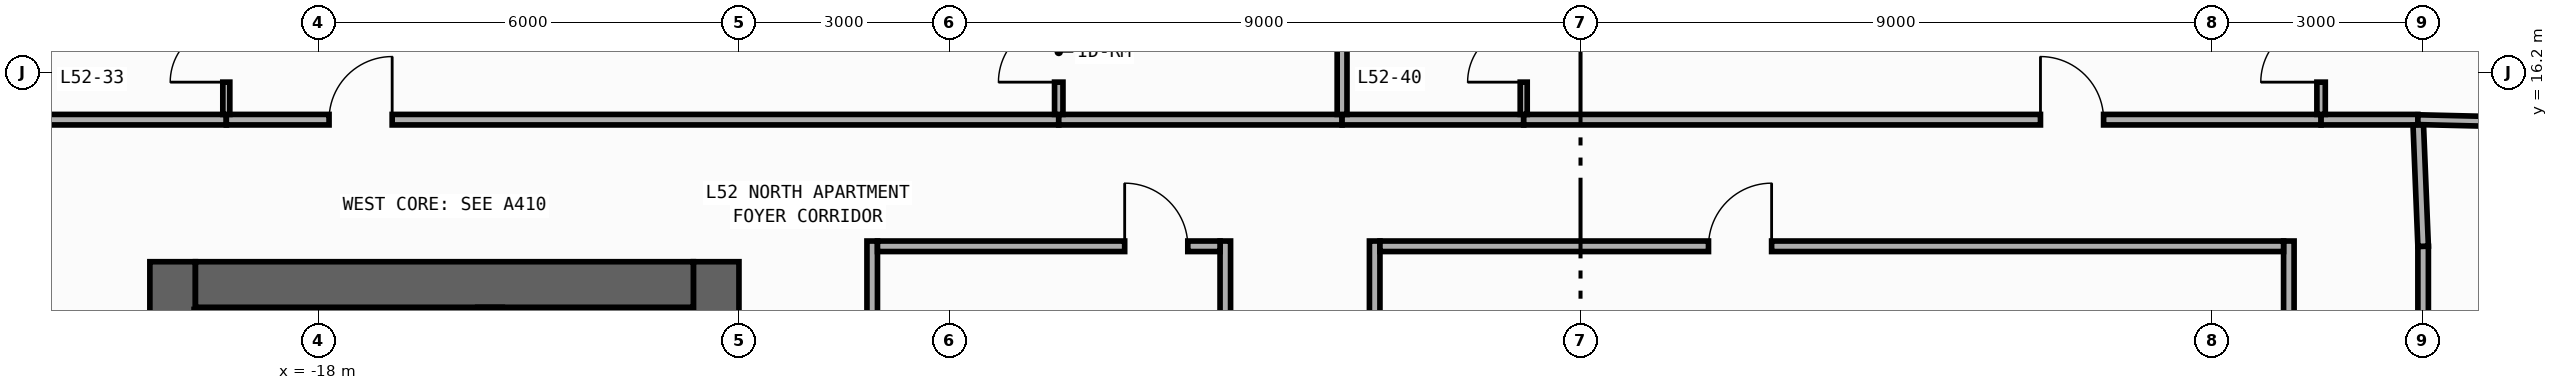
"""IFC4 building model, lengths in metres.
Left out: names, types, materials, properties, quantities, classifications, styles, units other than length and angle.
Written with IfcOpenShell. Run it as: python <this file> out.ifc"""

import sys

from ifc_helpers import new_model, si_unit, direction, frame, frame_2d, origin, place, context, subcontext, project, spatial, rectangle, extrude, element, fill, save


model = new_model("IFC4")
c1 = context("Model", 3, precision=1e-05, world=origin(), true_north=direction((0.0, 1.0)))
c2 = subcontext(c1, "Body", "Model", "MODEL_VIEW")
j1 = project(units=[si_unit("LENGTHUNIT", "METRE"), si_unit("PLANEANGLEUNIT", "RADIAN")], contexts=[c1])
p1 = place(None, origin())
s1 = spatial("IfcSite", under=j1, at=p1, CompositionType="ELEMENT")
p2 = place(p1, origin())
s2 = spatial("IfcBuilding", under=s1, at=p2, CompositionType="ELEMENT")
p3 = place(p2, frame((0.0, 0.0, 226.0)))
s3 = spatial("IfcBuildingStorey", under=s2, at=p3, CompositionType="ELEMENT", Elevation=226.0)
p4 = place(p3, frame((-20.075, -13.5, 0.0), z_axis=(0.0, 0.0, 1.0), x_axis=(0.0, 1.0, 0.0)))
e1 = element("IfcWall", 1, at=p4, inside=s3, PredefinedType="SHEAR", context=c2, shape_type="SweptSolid", body=[
    extrude(rectangle(XDim=27.0, YDim=0.65, at=frame_2d((13.5, 0.0))), origin(), (0.0, 0.0, 1.0), 3.34),
])
p5 = place(p3, frame((-12.325, -13.5, 0.0), z_axis=(0.0, 0.0, 1.0), x_axis=(0.0, 1.0, 0.0)))
e2 = element("IfcWall", 2, at=p5, inside=s3, PredefinedType="SHEAR", context=c2, shape_type="SweptSolid", body=[
    extrude(rectangle(XDim=27.0, YDim=0.65, at=frame_2d((13.5, 0.0))), origin(), (0.0, 0.0, 1.0), 3.34),
])
p6 = place(p5, frame((15.175, 0.0, 0.0)))
e3 = element("IfcOpeningElement", 3, at=p6, cuts=e2, PredefinedType="OPENING", context=c2, shape_type="SweptSolid", body=[
    extrude(rectangle(XDim=0.85, YDim=2.1, at=frame_2d((0.425, 1.05))), frame((0.0, 0.335, 0.0), z_axis=(0.0, -1.0, 0.0), x_axis=(1.0, 0.0, 0.0)), (0.0, 0.0, 1.0), 0.67),
])
p7 = place(p5, frame((21.275, 0.0, 0.0)))
e4 = element("IfcOpeningElement", 4, at=p7, cuts=e2, PredefinedType="OPENING", context=c2, shape_type="SweptSolid", body=[
    extrude(rectangle(XDim=0.85, YDim=2.1, at=frame_2d((0.425, 1.05))), frame((0.0, 0.335, 0.0), z_axis=(0.0, -1.0, 0.0), x_axis=(1.0, 0.0, 0.0)), (0.0, 0.0, 1.0), 0.67),
])
p8 = place(p5, frame((4.275, 0.0, 0.0)))
e5 = element("IfcOpeningElement", 5, at=p8, cuts=e2, PredefinedType="OPENING", context=c2, shape_type="SweptSolid", body=[
    extrude(rectangle(XDim=0.85, YDim=2.1, at=frame_2d((0.425, 1.05))), frame((0.0, 0.335, 0.0), z_axis=(0.0, -1.0, 0.0), x_axis=(1.0, 0.0, 0.0)), (0.0, 0.0, 1.0), 0.67),
])
p9 = place(p5, frame((10.275, 0.0, 0.0)))
e6 = element("IfcOpeningElement", 6, at=p9, cuts=e2, PredefinedType="OPENING", context=c2, shape_type="SweptSolid", body=[
    extrude(rectangle(XDim=0.85, YDim=2.1, at=frame_2d((0.425, 1.05))), frame((0.0, 0.335, 0.0), z_axis=(0.0, -1.0, 0.0), x_axis=(1.0, 0.0, 0.0)), (0.0, 0.0, 1.0), 0.67),
])
p10 = place(p5, frame((12.725, 0.0, 0.0)))
e7 = element("IfcOpeningElement", 7, at=p10, cuts=e2, PredefinedType="OPENING", context=c2, shape_type="SweptSolid", body=[
    extrude(rectangle(XDim=1.15, YDim=2.2, at=frame_2d((0.575, 1.1))), frame((0.0, 0.335, 0.0), z_axis=(0.0, -1.0, 0.0), x_axis=(1.0, 0.0, 0.0)), (0.0, 0.0, 1.0), 0.67),
])
p11 = place(p5, frame((1.625, 0.0, 0.0)))
e8 = element("IfcOpeningElement", 8, at=p11, cuts=e2, PredefinedType="OPENING", context=c2, shape_type="SweptSolid", body=[
    extrude(rectangle(XDim=0.85, YDim=2.1, at=frame_2d((0.425, 1.05))), frame((0.0, 0.335, 0.0), z_axis=(0.0, -1.0, 0.0), x_axis=(1.0, 0.0, 0.0)), (0.0, 0.0, 1.0), 0.67),
])
p12 = place(p3, frame((-19.75, 13.175, 0.0), z_axis=(0.0, 0.0, 1.0), x_axis=(1.0, 0.0, 0.0)))
e9 = element("IfcWall", 9, at=p12, inside=s3, PredefinedType="SHEAR", context=c2, shape_type="SweptSolid", body=[
    extrude(rectangle(XDim=7.1, YDim=0.65, at=frame_2d((3.55, 0.0))), origin(), (0.0, 0.0, 1.0), 3.34),
])
p13 = place(p3, frame((-15.55, -12.85, 0.0), z_axis=(0.0, 0.0, 1.0), x_axis=(0.0, 1.0, 0.0)))
e10 = element("IfcWall", 10, at=p13, inside=s3, PredefinedType="SHEAR", context=c2, shape_type="SweptSolid", body=[
    extrude(rectangle(XDim=25.7, YDim=0.35, at=frame_2d((12.85, 0.0))), origin(), (0.0, 0.0, 1.0), 3.34),
])
p14 = place(p13, frame((12.075, 0.0, 0.0)))
e11 = element("IfcOpeningElement", 11, at=p14, cuts=e10, PredefinedType="OPENING", context=c2, shape_type="SweptSolid", body=[
    extrude(rectangle(XDim=1.15, YDim=2.2, at=frame_2d((0.575, 1.1))), frame((0.0, 0.185, 0.0), z_axis=(0.0, -1.0, 0.0), x_axis=(1.0, 0.0, 0.0)), (0.0, 0.0, 1.0), 0.37),
])
p15 = place(p13, frame((0.975, 0.0, 0.0)))
e12 = element("IfcOpeningElement", 12, at=p15, cuts=e10, PredefinedType="OPENING", context=c2, shape_type="SweptSolid", body=[
    extrude(rectangle(XDim=0.85, YDim=2.1, at=frame_2d((0.425, 1.05))), frame((0.0, 0.185, 0.0), z_axis=(0.0, -1.0, 0.0), x_axis=(1.0, 0.0, 0.0)), (0.0, 0.0, 1.0), 0.37),
])
p16 = place(p3, frame((-19.77, 12.71, 0.0), z_axis=(0.0, 0.0, 1.0), x_axis=(1.0, 0.0, 0.0)))
e13 = element("IfcWall", 13, at=p16, inside=s3, PredefinedType="SHEAR", context=c2, shape_type="SweptSolid", body=[
    extrude(rectangle(XDim=4.065, YDim=0.22, at=frame_2d((2.032, 0.0))), origin(), (0.0, 0.0, 1.0), 3.34),
])
p17 = place(p3, frame((-10.1, -2.81, 0.0), z_axis=(0.0, 0.0, 1.0), x_axis=(0.0, 1.0, 0.0)))
e14 = element("IfcWall", 14, at=p17, inside=s3, PredefinedType="PARTITIONING", context=c2, shape_type="SweptSolid", body=[
    extrude(rectangle(XDim=16.605, YDim=0.15, at=frame_2d((8.302, 0.0))), origin(), (0.0, 0.0, 1.0), 3.34),
])
p18 = place(p17, frame((7.751, 0.0, 0.0)))
e15 = element("IfcOpeningElement", 15, at=p18, cuts=e14, PredefinedType="OPENING", context=c2, shape_type="SweptSolid", body=[
    extrude(rectangle(XDim=0.9, YDim=2.15, at=frame_2d((0.45, 1.075))), frame((0.0, 0.085, 0.0), z_axis=(0.0, -1.0, 0.0), x_axis=(1.0, 0.0, 0.0)), (0.0, 0.0, 1.0), 0.17),
])
p19 = place(p3, frame((12.015, 7.2, 0.0), z_axis=(0.0, 0.0, 1.0), x_axis=(0.0, 1.0, 0.0)))
e16 = element("IfcWall", 16, at=p19, inside=s3, PredefinedType="PARTITIONING", context=c2, shape_type="SweptSolid", body=[
    extrude(rectangle(XDim=6.52, YDim=0.15, at=frame_2d((3.26, 0.0))), origin(), (0.0, 0.0, 1.0), 3.34),
])
p20 = place(p19, frame((0.67, 0.0, 0.0)))
e17 = element("IfcOpeningElement", 17, at=p20, cuts=e16, PredefinedType="OPENING", context=c2, shape_type="SweptSolid", body=[
    extrude(rectangle(XDim=0.9, YDim=2.15, at=frame_2d((0.45, 1.075))), frame((0.0, 0.085, 0.0), z_axis=(0.0, -1.0, 0.0), x_axis=(1.0, 0.0, 0.0)), (0.0, 0.0, 1.0), 0.17),
])
p21 = place(p3, frame((10.1, -2.81, 0.0), z_axis=(0.0, 0.0, 1.0), x_axis=(0.0, 1.0, 0.0)))
e18 = element("IfcWall", 18, at=p21, inside=s3, PredefinedType="PARTITIONING", context=c2, shape_type="SweptSolid", body=[
    extrude(rectangle(XDim=16.605, YDim=0.15, at=frame_2d((8.302, 0.0))), origin(), (0.0, 0.0, 1.0), 3.34),
])
p22 = place(p21, frame((7.751, 0.0, 0.0)))
e19 = element("IfcOpeningElement", 19, at=p22, cuts=e18, PredefinedType="OPENING", context=c2, shape_type="SweptSolid", body=[
    extrude(rectangle(XDim=0.9, YDim=2.15, at=frame_2d((0.45, 1.075))), frame((0.0, 0.085, 0.0), z_axis=(0.0, -1.0, 0.0), x_axis=(1.0, 0.0, 0.0)), (0.0, 0.0, 1.0), 0.17),
])
p23 = place(p3, frame((-5.065, -2.66, 0.0), z_axis=(0.0, 0.0, 1.0), x_axis=(0.0, 1.0, 0.0)))
e20 = element("IfcWall", 20, at=p23, inside=s3, PredefinedType="PARTITIONING", context=c2, shape_type="SweptSolid", body=[
    extrude(rectangle(XDim=16.455, YDim=0.15, at=frame_2d((8.228, 0.0))), origin(), (0.0, 0.0, 1.0), 2.99),
])
p24 = place(p23, frame((7.677, 0.0, 0.0)))
e21 = element("IfcOpeningElement", 21, at=p24, cuts=e20, PredefinedType="OPENING", context=c2, shape_type="SweptSolid", body=[
    extrude(rectangle(XDim=0.9, YDim=2.15, at=frame_2d((0.45, 1.075))), frame((0.0, 0.085, 0.0), z_axis=(0.0, -1.0, 0.0), x_axis=(1.0, 0.0, 0.0)), (0.0, 0.0, 1.0), 0.17),
])
p25 = place(p3, frame((-2.935, -2.66, 0.0), z_axis=(0.0, 0.0, 1.0), x_axis=(0.0, 1.0, 0.0)))
e22 = element("IfcWall", 22, at=p25, inside=s3, PredefinedType="PARTITIONING", context=c2, shape_type="SweptSolid", body=[
    extrude(rectangle(XDim=16.455, YDim=0.15, at=frame_2d((8.228, 0.0))), origin(), (0.0, 0.0, 1.0), 3.34),
])
p26 = place(p25, frame((7.677, 0.0, 0.0)))
e23 = element("IfcOpeningElement", 23, at=p26, cuts=e22, PredefinedType="OPENING", context=c2, shape_type="SweptSolid", body=[
    extrude(rectangle(XDim=0.9, YDim=2.15, at=frame_2d((0.45, 1.075))), frame((0.0, 0.085, 0.0), z_axis=(0.0, -1.0, 0.0), x_axis=(1.0, 0.0, 0.0)), (0.0, 0.0, 1.0), 0.17),
])
p27 = place(p3, frame((-21.955, 15.525, 0.0), z_axis=(0.0, 0.0, 1.0), x_axis=(1.0, 0.0, 0.0)))
e24 = element("IfcWall", 24, at=p27, inside=s3, PredefinedType="PARTITIONING", context=c2, shape_type="SweptSolid", body=[
    extrude(rectangle(XDim=2.645, YDim=0.15, at=frame_2d((1.323, 0.0))), origin(), (0.0, 0.0, 1.0), 3.34),
])
p28 = place(p3, frame((-19.31, 15.525, 0.0), z_axis=(0.0, 0.0, 1.0), x_axis=(1.0, 0.0, 0.0)))
e25 = element("IfcWall", 25, at=p28, inside=s3, PredefinedType="PARTITIONING", context=c2, shape_type="SweptSolid", body=[
    extrude(rectangle(XDim=11.87, YDim=0.15, at=frame_2d((5.935, 0.0))), origin(), (0.0, 0.0, 1.0), 3.34),
])
p29 = place(p28, frame((1.465, 0.0, 0.0)))
e26 = element("IfcOpeningElement", 26, at=p29, cuts=e25, PredefinedType="OPENING", context=c2, shape_type="SweptSolid", body=[
    extrude(rectangle(XDim=0.9, YDim=2.15, at=frame_2d((0.45, 1.075))), frame((0.0, 0.085, 0.0), z_axis=(0.0, -1.0, 0.0), x_axis=(1.0, 0.0, 0.0)), (0.0, 0.0, 1.0), 0.17),
])
p30 = place(p3, frame((-7.44, 15.525, 0.0), z_axis=(0.0, 0.0, 1.0), x_axis=(1.0, 0.0, 0.0)))
e27 = element("IfcWall", 27, at=p30, inside=s3, PredefinedType="PARTITIONING", context=c2, shape_type="SweptSolid", body=[
    extrude(rectangle(XDim=4.04, YDim=0.15, at=frame_2d((2.02, 0.0))), origin(), (0.0, 0.0, 1.0), 3.34),
])
p31 = place(p3, frame((-3.4, 15.525, 0.0), z_axis=(0.0, 0.0, 1.0), x_axis=(1.0, 0.0, 0.0)))
e28 = element("IfcWall", 28, at=p31, inside=s3, PredefinedType="PARTITIONING", context=c2, shape_type="SweptSolid", body=[
    extrude(rectangle(XDim=2.59, YDim=0.15, at=frame_2d((1.295, 0.0))), origin(), (0.0, 0.0, 1.0), 3.34),
])
p32 = place(p3, frame((-0.81, 15.525, 0.0), z_axis=(0.0, 0.0, 1.0), x_axis=(1.0, 0.0, 0.0)))
e29 = element("IfcWall", 29, at=p32, inside=s3, PredefinedType="PARTITIONING", context=c2, shape_type="SweptSolid", body=[
    extrude(rectangle(XDim=11.37, YDim=0.15, at=frame_2d((5.685, 0.0))), origin(), (0.0, 0.0, 1.0), 3.34),
])
p33 = place(p32, frame((7.368, 0.0, 0.0)))
e30 = element("IfcOpeningElement", 30, at=p33, cuts=e29, PredefinedType="OPENING", context=c2, shape_type="SweptSolid", body=[
    extrude(rectangle(XDim=0.9, YDim=2.15, at=frame_2d((0.45, 1.075))), frame((0.0, 0.085, 0.0), z_axis=(0.0, -1.0, 0.0), x_axis=(1.0, 0.0, 0.0)), (0.0, 0.0, 1.0), 0.17),
])
p34 = place(p3, frame((10.56, 15.525, 0.0), z_axis=(0.0, 0.0, 1.0), x_axis=(1.0, 0.0, 0.0)))
e31 = element("IfcWall", 31, at=p34, inside=s3, PredefinedType="PARTITIONING", context=c2, shape_type="SweptSolid", body=[
    extrude(rectangle(XDim=1.38, YDim=0.15, at=frame_2d((0.69, 0.0))), origin(), (0.0, 0.0, 1.0), 3.34),
])
p35 = place(p3, frame((12.015, 13.72, 0.0), z_axis=(0.0, 0.0, 1.0), x_axis=(-0.040046877756, 0.99919780203, 0.0)))
e32 = element("IfcWall", 32, at=p35, inside=s3, PredefinedType="PARTITIONING", context=c2, shape_type="SweptSolid", body=[
    extrude(rectangle(XDim=1.731, YDim=0.15, at=frame_2d((0.866, 0.0))), origin(), (0.0, 0.0, 1.0), 3.34),
])
p36 = place(p3, frame((-10.025, 13.72, 0.0), z_axis=(0.0, 0.0, 1.0), x_axis=(1.0, 0.0, 0.0)))
e33 = element("IfcWall", 33, at=p36, inside=s3, PredefinedType="PARTITIONING", context=c2, shape_type="SweptSolid", body=[
    extrude(rectangle(XDim=4.885, YDim=0.15, at=frame_2d((2.442, 0.0))), origin(), (0.0, 0.0, 1.0), 3.34),
])
p37 = place(p36, frame((3.525, 0.0, 0.0)))
e34 = element("IfcOpeningElement", 34, at=p37, cuts=e33, PredefinedType="OPENING", context=c2, shape_type="SweptSolid", body=[
    extrude(rectangle(XDim=0.9, YDim=2.15, at=frame_2d((0.45, 1.075))), frame((0.0, 0.085, 0.0), z_axis=(0.0, -1.0, 0.0), x_axis=(1.0, 0.0, 0.0)), (0.0, 0.0, 1.0), 0.17),
])
p38 = place(p3, frame((-2.86, 13.72, 0.0), z_axis=(0.0, 0.0, 1.0), x_axis=(1.0, 0.0, 0.0)))
e35 = element("IfcWall", 35, at=p38, inside=s3, PredefinedType="PARTITIONING", context=c2, shape_type="SweptSolid", body=[
    extrude(rectangle(XDim=12.885, YDim=0.15, at=frame_2d((6.442, 0.0))), origin(), (0.0, 0.0, 1.0), 3.34),
])
p39 = place(p38, frame((4.685, 0.0, 0.0)))
e36 = element("IfcOpeningElement", 36, at=p39, cuts=e35, PredefinedType="OPENING", context=c2, shape_type="SweptSolid", body=[
    extrude(rectangle(XDim=0.9, YDim=2.15, at=frame_2d((0.45, 1.075))), frame((0.0, 0.085, 0.0), z_axis=(0.0, -1.0, 0.0), x_axis=(1.0, 0.0, 0.0)), (0.0, 0.0, 1.0), 0.17),
])
p40 = place(p3, frame((-19.31, 15.6, 0.0), z_axis=(0.0, 0.0, 1.0), x_axis=(0.0, 1.0, 0.0)))
e37 = element("IfcWall", 37, at=p40, inside=s3, PredefinedType="PARTITIONING", context=c2, shape_type="SweptSolid", body=[
    extrude(rectangle(XDim=2.5, YDim=0.1, at=frame_2d((1.25, 0.0))), origin(), (0.0, 0.0, 1.0), 3.34),
])
p41 = place(p40, frame((0.46, 0.0, 0.0)))
e38 = element("IfcOpeningElement", 38, at=p41, cuts=e37, PredefinedType="OPENING", context=c2, shape_type="SweptSolid", body=[
    extrude(rectangle(XDim=0.8, YDim=2.1, at=frame_2d((0.4, 1.05))), frame((0.0, 0.06, 0.0), z_axis=(0.0, -1.0, 0.0), x_axis=(1.0, 0.0, 0.0)), (0.0, 0.0, 1.0), 0.12),
])
p42 = place(p3, frame((-7.44, 15.6, 0.0), z_axis=(0.0, 0.0, 1.0), x_axis=(0.0, 1.0, 0.0)))
e39 = element("IfcWall", 39, at=p42, inside=s3, PredefinedType="PARTITIONING", context=c2, shape_type="SweptSolid", body=[
    extrude(rectangle(XDim=4.5, YDim=0.12, at=frame_2d((2.25, 0.0))), origin(), (0.0, 0.0, 1.0), 3.34),
])
p43 = place(p42, frame((0.46, 0.0, 0.0)))
e40 = element("IfcOpeningElement", 40, at=p43, cuts=e39, PredefinedType="OPENING", context=c2, shape_type="SweptSolid", body=[
    extrude(rectangle(XDim=0.86, YDim=2.15, at=frame_2d((0.43, 1.075))), frame((0.0, 0.07, 0.0), z_axis=(0.0, -1.0, 0.0), x_axis=(1.0, 0.0, 0.0)), (0.0, 0.0, 1.0), 0.14),
])
p44 = place(p3, frame((-3.4, 15.6, 0.0), z_axis=(0.0, 0.0, 1.0), x_axis=(0.0, 1.0, 0.0)))
e41 = element("IfcWall", 41, at=p44, inside=s3, PredefinedType="PARTITIONING", context=c2, shape_type="SweptSolid", body=[
    extrude(rectangle(XDim=2.5, YDim=0.14, at=frame_2d((1.25, 0.0))), origin(), (0.0, 0.0, 1.0), 3.34),
])
p45 = place(p3, frame((-0.81, 15.6, 0.0), z_axis=(0.0, 0.0, 1.0), x_axis=(0.0, 1.0, 0.0)))
e42 = element("IfcWall", 42, at=p45, inside=s3, PredefinedType="PARTITIONING", context=c2, shape_type="SweptSolid", body=[
    extrude(rectangle(XDim=2.5, YDim=0.1, at=frame_2d((1.25, 0.0))), origin(), (0.0, 0.0, 1.0), 3.34),
])
p46 = place(p45, frame((0.46, 0.0, 0.0)))
e43 = element("IfcOpeningElement", 43, at=p46, cuts=e42, PredefinedType="OPENING", context=c2, shape_type="SweptSolid", body=[
    extrude(rectangle(XDim=0.8, YDim=2.1, at=frame_2d((0.4, 1.05))), frame((0.0, 0.06, 0.0), z_axis=(0.0, -1.0, 0.0), x_axis=(1.0, 0.0, 0.0)), (0.0, 0.0, 1.0), 0.12),
])
p47 = place(p3, frame((10.56, 15.6, 0.0), z_axis=(0.0, 0.0, 1.0), x_axis=(0.0, 1.0, 0.0)))
e44 = element("IfcWall", 44, at=p47, inside=s3, PredefinedType="PARTITIONING", context=c2, shape_type="SweptSolid", body=[
    extrude(rectangle(XDim=4.5, YDim=0.12, at=frame_2d((2.25, 0.0))), origin(), (0.0, 0.0, 1.0), 3.34),
])
p48 = place(p47, frame((0.46, 0.0, 0.0)))
e45 = element("IfcOpeningElement", 45, at=p48, cuts=e44, PredefinedType="OPENING", context=c2, shape_type="SweptSolid", body=[
    extrude(rectangle(XDim=0.86, YDim=2.15, at=frame_2d((0.43, 1.075))), frame((0.0, 0.07, 0.0), z_axis=(0.0, -1.0, 0.0), x_axis=(1.0, 0.0, 0.0)), (0.0, 0.0, 1.0), 0.14),
])
p49 = place(p3, frame((11.94, 15.525, 0.0), z_axis=(0.0, 0.0, 1.0), x_axis=(0.999719241816, -0.023694673289, 0.0)))
e46 = element("IfcWall", 46, at=p49, inside=s3, PredefinedType="PARTITIONING", context=c2, shape_type="SweptSolid", body=[
    extrude(rectangle(XDim=2.741, YDim=0.14, at=frame_2d((1.37, 0.0))), origin(), (0.0, 0.0, 1.0), 3.34),
])
p50 = place(p29, origin())
e47 = element("IfcDoor", 47, at=p50, inside=s3, OperationType="SINGLE_SWING_RIGHT", PredefinedType="DOOR", context=c2, shape_type="SweptSolid", body=[
    extrude(rectangle(XDim=0.9, YDim=2.15, at=frame_2d((0.45, 1.075))), frame((0.0, 0.025, 0.0), z_axis=(0.0, -1.0, 0.0), x_axis=(1.0, 0.0, 0.0)), (0.0, 0.0, 1.0), 0.05),
])
fill(e26, e47)
p51 = place(p33, origin())
e48 = element("IfcDoor", 48, at=p51, inside=s3, OperationType="SINGLE_SWING_LEFT", PredefinedType="DOOR", context=c2, shape_type="SweptSolid", body=[
    extrude(rectangle(XDim=0.9, YDim=2.15, at=frame_2d((0.45, 1.075))), frame((0.0, 0.025, 0.0), z_axis=(0.0, -1.0, 0.0), x_axis=(1.0, 0.0, 0.0)), (0.0, 0.0, 1.0), 0.05),
])
fill(e30, e48)
p52 = place(p37, origin())
e49 = element("IfcDoor", 49, at=p52, inside=s3, OperationType="SINGLE_SWING_LEFT", PredefinedType="DOOR", context=c2, shape_type="SweptSolid", body=[
    extrude(rectangle(XDim=0.9, YDim=2.15, at=frame_2d((0.45, 1.075))), frame((0.0, 0.025, 0.0), z_axis=(0.0, -1.0, 0.0), x_axis=(1.0, 0.0, 0.0)), (0.0, 0.0, 1.0), 0.05),
])
fill(e34, e49)
p53 = place(p39, origin())
e50 = element("IfcDoor", 50, at=p53, inside=s3, OperationType="SINGLE_SWING_RIGHT", PredefinedType="DOOR", context=c2, shape_type="SweptSolid", body=[
    extrude(rectangle(XDim=0.9, YDim=2.15, at=frame_2d((0.45, 1.075))), frame((0.0, 0.025, 0.0), z_axis=(0.0, -1.0, 0.0), x_axis=(1.0, 0.0, 0.0)), (0.0, 0.0, 1.0), 0.05),
])
fill(e36, e50)
p54 = place(p41, origin())
e51 = element("IfcDoor", 51, at=p54, inside=s3, OperationType="SINGLE_SWING_LEFT", PredefinedType="DOOR", context=c2, shape_type="SweptSolid", body=[
    extrude(rectangle(XDim=0.8, YDim=2.1, at=frame_2d((0.4, 1.05))), frame((0.0, 0.025, 0.0), z_axis=(0.0, -1.0, 0.0), x_axis=(1.0, 0.0, 0.0)), (0.0, 0.0, 1.0), 0.05),
])
fill(e38, e51)
p55 = place(p43, origin())
e52 = element("IfcDoor", 52, at=p55, inside=s3, OperationType="SINGLE_SWING_LEFT", PredefinedType="DOOR", context=c2, shape_type="SweptSolid", body=[
    extrude(rectangle(XDim=0.86, YDim=2.15, at=frame_2d((0.43, 1.075))), frame((0.0, 0.025, 0.0), z_axis=(0.0, -1.0, 0.0), x_axis=(1.0, 0.0, 0.0)), (0.0, 0.0, 1.0), 0.05),
])
fill(e40, e52)
p56 = place(p46, origin())
e53 = element("IfcDoor", 53, at=p56, inside=s3, OperationType="SINGLE_SWING_LEFT", PredefinedType="DOOR", context=c2, shape_type="SweptSolid", body=[
    extrude(rectangle(XDim=0.8, YDim=2.1, at=frame_2d((0.4, 1.05))), frame((0.0, 0.025, 0.0), z_axis=(0.0, -1.0, 0.0), x_axis=(1.0, 0.0, 0.0)), (0.0, 0.0, 1.0), 0.05),
])
fill(e43, e53)
p57 = place(p48, origin())
e54 = element("IfcDoor", 54, at=p57, inside=s3, OperationType="SINGLE_SWING_LEFT", PredefinedType="DOOR", context=c2, shape_type="SweptSolid", body=[
    extrude(rectangle(XDim=0.86, YDim=2.15, at=frame_2d((0.43, 1.075))), frame((0.0, 0.025, 0.0), z_axis=(0.0, -1.0, 0.0), x_axis=(1.0, 0.0, 0.0)), (0.0, 0.0, 1.0), 0.05),
])
fill(e45, e54)
save(model, sys.argv[1])
